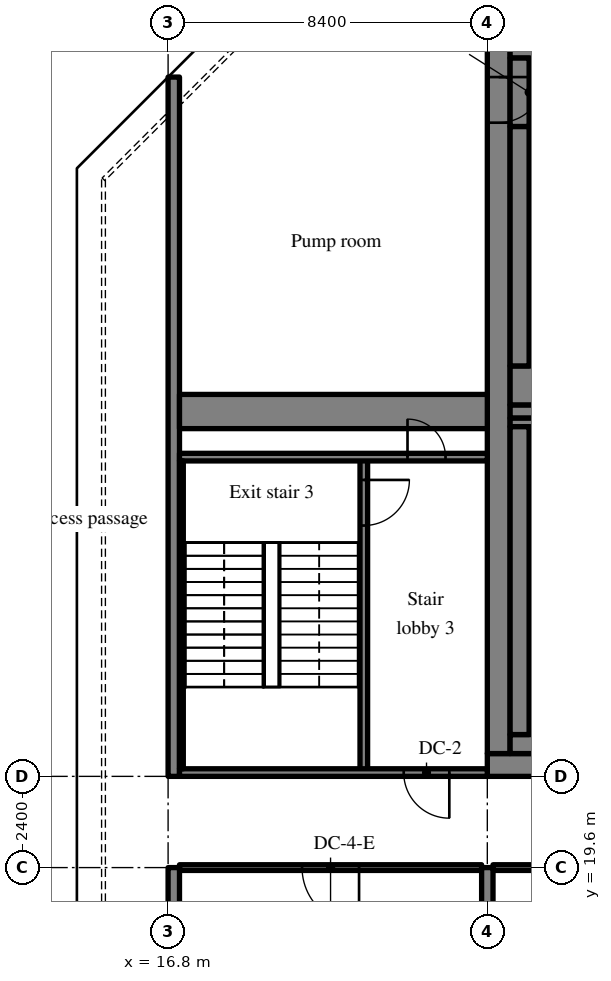
"""IFC4 building model, lengths in metres.
Left out: names, types, materials, properties, quantities, classifications, styles, units other than length and angle.
Written with IfcOpenShell. Run it as: python <this file> out.ifc"""

import sys

from ifc_helpers import new_model, si_unit, direction, frame, frame_2d, origin, place, context, subcontext, project, spatial, rectangle, extrude, source, transform, mapped, element, fill, save


model = new_model("IFC4")
c1 = context("Model", 3, precision=1e-05, world=origin(), true_north=direction((0.0, 1.0)))
c2 = subcontext(c1, "Body", "Model", "MODEL_VIEW")
j1 = project(units=[si_unit("LENGTHUNIT", "METRE"), si_unit("PLANEANGLEUNIT", "RADIAN")], contexts=[c1])
p1 = place(None, origin())
s1 = spatial("IfcSite", under=j1, at=p1, CompositionType="ELEMENT")
p2 = place(p1, origin())
s2 = spatial("IfcBuilding", under=s1, at=p2, CompositionType="ELEMENT")
p3 = place(p2, frame((0.0, 0.0, 264.7)))
s3 = spatial("IfcBuildingStorey", under=s2, at=p3, CompositionType="ELEMENT", Elevation=264.7)
m1 = source(origin(), c2, "Body", "SweptSolid", [
    extrude(rectangle(XDim=50.4, YDim=0.6, at=frame_2d((25.2, 0.0))), origin(), (0.0, 0.0, 1.0), 5.12),
])
p4 = place(p3, frame((25.2, 22.3, 0.0), z_axis=(0.0, 0.0, 1.0), x_axis=(1.0, 0.0, 0.0)))
e1 = element("IfcWall", 1, at=p4, inside=s3, PredefinedType="SHEAR", context=c2, shape_type="MappedRepresentation", body=[
    mapped(m1, transform((0.0, 0.0, 0.0), scale=1.0)),
])
m2 = source(origin(), c2, "Body", "SweptSolid", [
    extrude(rectangle(XDim=1.2, YDim=2.1, at=frame_2d((0.6, 1.05))), frame((0.0, 0.31, 0.0), z_axis=(0.0, -1.0, 0.0), x_axis=(1.0, 0.0, 0.0)), (0.0, 0.0, 1.0), 0.62),
])
p5 = place(p4, frame((22.262, 0.0, 0.0)))
e2 = element("IfcOpeningElement", 2, at=p5, cuts=e1, PredefinedType="OPENING", context=c2, shape_type="MappedRepresentation", body=[
    mapped(m2, transform((0.0, 0.0, 0.0), scale=1.0)),
])
m3 = source(origin(), c2, "Body", "SweptSolid", [
    extrude(rectangle(XDim=0.9, YDim=2.1, at=frame_2d((0.45, 1.05))), frame((0.0, 0.31, 0.0), z_axis=(0.0, -1.0, 0.0), x_axis=(1.0, 0.0, 0.0)), (0.0, 0.0, 1.0), 0.62),
])
p6 = place(p4, frame((17.25, 0.0, 0.0)))
e3 = element("IfcOpeningElement", 3, at=p6, cuts=e1, PredefinedType="OPENING", context=c2, shape_type="MappedRepresentation", body=[
    mapped(m3, transform((0.0, 0.0, 0.0), scale=1.0)),
])
p7 = place(p4, frame((9.656, 0.0, 0.0)))
e4 = element("IfcOpeningElement", 4, at=p7, cuts=e1, PredefinedType="OPENING", context=c2, shape_type="MappedRepresentation", body=[
    mapped(m3, transform((0.0, 0.0, 0.0), scale=1.0)),
])
p8 = place(p4, frame((12.719, 0.0, 0.0)))
e5 = element("IfcOpeningElement", 5, at=p8, cuts=e1, PredefinedType="OPENING", context=c2, shape_type="MappedRepresentation", body=[
    mapped(m3, transform((0.0, 0.0, 0.0), scale=1.0)),
])
m4 = source(origin(), c2, "Body", "SweptSolid", [
    extrude(rectangle(XDim=1.8, YDim=2.1, at=frame_2d((0.9, 1.05))), frame((0.0, 0.31, 0.0), z_axis=(0.0, -1.0, 0.0), x_axis=(1.0, 0.0, 0.0)), (0.0, 0.0, 1.0), 0.62),
])
p9 = place(p4, frame((32.7, 0.0, 0.0)))
e6 = element("IfcOpeningElement", 6, at=p9, cuts=e1, PredefinedType="OPENING", context=c2, shape_type="MappedRepresentation", body=[
    mapped(m4, transform((0.0, 0.0, 0.0), scale=1.0)),
])
p10 = place(p4, frame((6.488, 0.0, 0.0)))
e7 = element("IfcOpeningElement", 7, at=p10, cuts=e1, PredefinedType="OPENING", context=c2, shape_type="MappedRepresentation", body=[
    mapped(m2, transform((0.0, 0.0, 0.0), scale=1.0)),
])
p11 = place(p4, frame((47.925, 0.0, 0.0)))
e8 = element("IfcOpeningElement", 8, at=p11, cuts=e1, PredefinedType="OPENING", context=c2, shape_type="MappedRepresentation", body=[
    mapped(m2, transform((0.0, 0.0, 0.0), scale=1.0)),
])
m5 = source(origin(), c2, "Body", "SweptSolid", [
    extrude(rectangle(XDim=18.8, YDim=0.6, at=frame_2d((9.4, 0.0))), origin(), (0.0, 0.0, 1.0), 5.12),
])
p12 = place(p3, frame((25.5, 22.6, 0.0), z_axis=(0.0, 0.0, 1.0), x_axis=(0.0, 1.0, 0.0)))
e9 = element("IfcWall", 9, at=p12, inside=s3, PredefinedType="SHEAR", context=c2, shape_type="MappedRepresentation", body=[
    mapped(m5, transform((0.0, 0.0, 0.0), scale=1.0)),
])
p13 = place(p12, frame((16.6, 0.0, 0.0)))
e10 = element("IfcOpeningElement", 10, at=p13, cuts=e9, PredefinedType="OPENING", context=c2, shape_type="MappedRepresentation", body=[
    mapped(m2, transform((0.0, 0.0, 0.0), scale=1.0)),
])
m6 = source(origin(), c2, "Body", "SweptSolid", [
    extrude(rectangle(XDim=7.625, YDim=0.35, at=frame_2d((3.812, 0.0))), origin(), (0.0, 0.0, 1.0), 5.12),
])
p14 = place(p3, frame((25.8, 31.6, 0.0), z_axis=(0.0, 0.0, 1.0), x_axis=(1.0, 0.0, 0.0)))
e11 = element("IfcWall", 11, at=p14, inside=s3, PredefinedType="SHEAR", context=c2, shape_type="MappedRepresentation", body=[
    mapped(m6, transform((0.0, 0.0, 0.0), scale=1.0)),
])
m7 = source(origin(), c2, "Body", "SweptSolid", [
    extrude(rectangle(XDim=1.1, YDim=2.1, at=frame_2d((0.55, 1.05))), frame((0.0, 0.185, 0.0), z_axis=(0.0, -1.0, 0.0), x_axis=(1.0, 0.0, 0.0)), (0.0, 0.0, 1.0), 0.37),
])
p15 = place(p14, frame((5.938, 0.0, 0.0)))
e12 = element("IfcOpeningElement", 12, at=p15, cuts=e11, PredefinedType="OPENING", context=c2, shape_type="MappedRepresentation", body=[
    mapped(m7, transform((0.0, 0.0, 0.0), scale=1.0)),
])
m8 = source(origin(), c2, "Body", "SweptSolid", [
    extrude(rectangle(XDim=12.5, YDim=0.3, at=frame_2d((6.25, 0.0))), origin(), (0.0, 0.0, 1.0), 5.12),
])
p16 = place(p3, frame((16.95, 7.1, 0.0), z_axis=(0.0, 0.0, 1.0), x_axis=(0.0, 1.0, 0.0)))
e13 = element("IfcWall", 13, at=p16, inside=s3, PredefinedType="SHEAR", context=c2, shape_type="MappedRepresentation", body=[
    mapped(m8, transform((0.0, 0.0, 0.0), scale=1.0)),
])
m9 = source(origin(), c2, "Body", "SweptSolid", [
    extrude(rectangle(XDim=18.4, YDim=0.3, at=frame_2d((9.2, 0.0))), origin(), (0.0, 0.0, 1.0), 5.12),
])
p17 = place(p3, frame((16.95, 22.0, 0.0), z_axis=(0.0, 0.0, 1.0), x_axis=(0.0, 1.0, 0.0)))
e14 = element("IfcWall", 14, at=p17, inside=s3, PredefinedType="SHEAR", context=c2, shape_type="MappedRepresentation", body=[
    mapped(m9, transform((0.0, 0.0, 0.0), scale=1.0)),
])
m10 = source(origin(), c2, "Body", "SweptSolid", [
    extrude(rectangle(XDim=14.1, YDim=0.3, at=frame_2d((7.05, 0.0))), origin(), (0.0, 0.0, 1.0), 5.12),
])
p18 = place(p3, frame((25.2, 5.5, 0.0), z_axis=(0.0, 0.0, 1.0), x_axis=(0.0, 1.0, 0.0)))
e15 = element("IfcWall", 15, at=p18, inside=s3, PredefinedType="SHEAR", context=c2, shape_type="MappedRepresentation", body=[
    mapped(m10, transform((0.0, 0.0, 0.0), scale=1.0)),
])
m11 = source(origin(), c2, "Body", "SweptSolid", [
    extrude(rectangle(XDim=8.1, YDim=0.9, at=frame_2d((4.05, 0.0))), origin(), (0.0, 0.0, 1.0), 5.12),
])
p19 = place(p3, frame((17.1, 31.6, 0.0), z_axis=(0.0, 0.0, 1.0), x_axis=(1.0, 0.0, 0.0)))
e16 = element("IfcWall", 16, at=p19, inside=s3, PredefinedType="SHEAR", context=c2, shape_type="MappedRepresentation", body=[
    mapped(m11, transform((0.0, 0.0, 0.0), scale=1.0)),
])
m12 = source(origin(), c2, "Body", "SweptSolid", [
    extrude(rectangle(XDim=8.3, YDim=0.2, at=frame_2d((4.15, 0.0))), origin(), (0.0, 0.0, 1.0), 5.12),
])
p20 = place(p3, frame((21.95, 22.1, 0.0), z_axis=(0.0, 0.0, 1.0), x_axis=(0.0, 1.0, 0.0)))
e17 = element("IfcWall", 17, at=p20, inside=s3, PredefinedType="SOLIDWALL", context=c2, shape_type="MappedRepresentation", body=[
    mapped(m12, transform((0.0, 0.0, 0.0), scale=1.0)),
])
m13 = source(origin(), c2, "Body", "SweptSolid", [
    extrude(rectangle(XDim=1.2, YDim=2.1, at=frame_2d((0.6, 1.05))), frame((0.0, 0.11, 0.0), z_axis=(0.0, -1.0, 0.0), x_axis=(1.0, 0.0, 0.0)), (0.0, 0.0, 1.0), 0.22),
])
p21 = place(p20, frame((6.5, 0.0, 0.0)))
e18 = element("IfcOpeningElement", 18, at=p21, cuts=e17, PredefinedType="OPENING", context=c2, shape_type="MappedRepresentation", body=[
    mapped(m13, transform((0.0, 0.0, 0.0), scale=1.0)),
])
m14 = source(origin(), c2, "Body", "SweptSolid", [
    extrude(rectangle(XDim=8.1, YDim=0.2, at=frame_2d((4.05, 0.0))), origin(), (0.0, 0.0, 1.0), 5.12),
])
p22 = place(p3, frame((17.1, 22.1, 0.0), z_axis=(0.0, 0.0, 1.0), x_axis=(1.0, 0.0, 0.0)))
e19 = element("IfcWall", 19, at=p22, inside=s3, PredefinedType="SOLIDWALL", context=c2, shape_type="MappedRepresentation", body=[
    mapped(m14, transform((0.0, 0.0, 0.0), scale=1.0)),
])
p23 = place(p22, frame((5.9, 0.0, 0.0)))
e20 = element("IfcOpeningElement", 20, at=p23, cuts=e19, PredefinedType="OPENING", context=c2, shape_type="MappedRepresentation", body=[
    mapped(m13, transform((0.0, 0.0, 0.0), scale=1.0)),
])
p24 = place(p3, frame((25.2, 30.4, 0.0), z_axis=(0.0, 0.0, 1.0), x_axis=(-1.0, 0.0, 0.0)))
e21 = element("IfcWall", 21, at=p24, inside=s3, PredefinedType="SOLIDWALL", context=c2, shape_type="MappedRepresentation", body=[
    mapped(m14, transform((0.0, 0.0, 0.0), scale=1.0)),
])
m15 = source(origin(), c2, "Body", "SweptSolid", [
    extrude(rectangle(XDim=1.0, YDim=2.1, at=frame_2d((0.5, 1.05))), frame((0.0, 0.11, 0.0), z_axis=(0.0, -1.0, 0.0), x_axis=(1.0, 0.0, 0.0)), (0.0, 0.0, 1.0), 0.22),
])
p25 = place(p24, frame((1.1, 0.0, 0.0)))
e22 = element("IfcOpeningElement", 22, at=p25, cuts=e21, PredefinedType="OPENING", context=c2, shape_type="MappedRepresentation", body=[
    mapped(m15, transform((0.0, 0.0, 0.0), scale=1.0)),
])
m16 = source(origin(), c2, "Body", "SweptSolid", [
    extrude(rectangle(XDim=5.15, YDim=0.5, at=frame_2d((2.575, 0.0))), origin(), (0.0, 0.0, 1.0), 5.12),
])
p26 = place(p3, frame((25.8, 22.85, 0.0), z_axis=(0.0, 0.0, 1.0), x_axis=(1.0, 0.0, 0.0)))
e23 = element("IfcWall", 23, at=p26, inside=s3, PredefinedType="SOLIDWALL", context=c2, shape_type="MappedRepresentation", body=[
    mapped(m16, transform((0.0, 0.0, 0.0), scale=1.0)),
])
m17 = source(origin(), c2, "Body", "SweptSolid", [
    extrude(rectangle(XDim=5.15, YDim=0.225, at=frame_2d((2.575, 0.0))), origin(), (0.0, 0.0, 1.0), 5.12),
])
p27 = place(p3, frame((25.8, 31.312, 0.0), z_axis=(0.0, 0.0, 1.0), x_axis=(1.0, 0.0, 0.0)))
e24 = element("IfcWall", 24, at=p27, inside=s3, PredefinedType="SOLIDWALL", context=c2, shape_type="MappedRepresentation", body=[
    mapped(m17, transform((0.0, 0.0, 0.0), scale=1.0)),
])
m18 = source(origin(), c2, "Body", "SweptSolid", [
    extrude(rectangle(XDim=8.1, YDim=0.5, at=frame_2d((4.05, 0.0))), origin(), (0.0, 0.0, 1.0), 5.12),
])
p28 = place(p3, frame((26.05, 23.1, 0.0), z_axis=(0.0, 0.0, 1.0), x_axis=(0.0, 1.0, 0.0)))
e25 = element("IfcWall", 25, at=p28, inside=s3, PredefinedType="SOLIDWALL", context=c2, shape_type="MappedRepresentation", body=[
    mapped(m18, transform((0.0, 0.0, 0.0), scale=1.0)),
])
m19 = source(origin(), c2, "Body", "SweptSolid", [
    extrude(rectangle(XDim=8.1, YDim=0.1, at=frame_2d((4.05, 0.0))), origin(), (0.0, 0.0, 1.0), 5.12),
])
p29 = place(p3, frame((17.15, 22.2, 0.0), z_axis=(0.0, 0.0, 1.0), x_axis=(0.0, 1.0, 0.0)))
e26 = element("IfcWall", 26, at=p29, inside=s3, PredefinedType="SOLIDWALL", context=c2, shape_type="MappedRepresentation", body=[
    mapped(m19, transform((0.0, 0.0, 0.0), scale=1.0)),
])
p30 = place(p3, frame((25.8, 41.15, 0.0), z_axis=(0.0, 0.0, 1.0), x_axis=(1.0, 0.0, 0.0)))
e27 = element("IfcWall", 27, at=p30, inside=s3, PredefinedType="SOLIDWALL", context=c2, shape_type="MappedRepresentation", body=[
    mapped(m16, transform((0.0, 0.0, 0.0), scale=1.0)),
])
m20 = source(origin(), c2, "Body", "SweptSolid", [
    extrude(rectangle(XDim=5.15, YDim=1.025, at=frame_2d((2.575, 0.0))), origin(), (0.0, 0.0, 1.0), 5.12),
])
p31 = place(p3, frame((25.8, 32.287, 0.0), z_axis=(0.0, 0.0, 1.0), x_axis=(1.0, 0.0, 0.0)))
e28 = element("IfcWall", 28, at=p31, inside=s3, PredefinedType="SOLIDWALL", context=c2, shape_type="MappedRepresentation", body=[
    mapped(m20, transform((0.0, 0.0, 0.0), scale=1.0)),
])
m21 = source(origin(), c2, "Body", "SweptSolid", [
    extrude(rectangle(XDim=6.3, YDim=0.5, at=frame_2d((3.15, 0.0))), origin(), (0.0, 0.0, 1.0), 5.12),
])
p32 = place(p3, frame((26.05, 32.8, 0.0), z_axis=(0.0, 0.0, 1.0), x_axis=(0.0, 1.0, 0.0)))
e29 = element("IfcWall", 29, at=p32, inside=s3, PredefinedType="SOLIDWALL", context=c2, shape_type="MappedRepresentation", body=[
    mapped(m21, transform((0.0, 0.0, 0.0), scale=1.0)),
])
m22 = source(origin(), c2, "Body", "SweptSolid", [
    extrude(rectangle(XDim=1.8, YDim=0.5, at=frame_2d((0.9, 0.0))), origin(), (0.0, 0.0, 1.0), 2.12),
])
p33 = place(p3, frame((26.05, 39.1, 3.0), z_axis=(0.0, 0.0, 1.0), x_axis=(0.0, 1.0, 0.0)))
e30 = element("IfcWall", 30, at=p33, inside=s3, PredefinedType="SOLIDWALL", context=c2, shape_type="MappedRepresentation", body=[
    mapped(m22, transform((0.0, 0.0, 0.0), scale=1.0)),
])
m23 = source(origin(), c2, "Body", "SweptSolid", [
    extrude(rectangle(XDim=7.95, YDim=0.15, at=frame_2d((3.975, 0.0))), origin(), (0.0, 0.0, 1.0), 4.37),
])
p34 = place(p3, frame((17.1, 19.6, 0.0), z_axis=(0.0, 0.0, 1.0), x_axis=(1.0, 0.0, 0.0)))
e31 = element("IfcWall", 31, at=p34, inside=s3, PredefinedType="PARTITIONING", context=c2, shape_type="MappedRepresentation", body=[
    mapped(m23, transform((0.0, 0.0, 0.0), scale=1.0)),
])
m24 = source(origin(), c2, "Body", "SweptSolid", [
    extrude(rectangle(XDim=1.5, YDim=2.1, at=frame_2d((0.75, 1.05))), frame((0.0, 0.085, 0.0), z_axis=(0.0, -1.0, 0.0), x_axis=(1.0, 0.0, 0.0)), (0.0, 0.0, 1.0), 0.17),
])
p35 = place(p34, frame((3.225, 0.0, 0.0)))
e32 = element("IfcOpeningElement", 32, at=p35, cuts=e31, PredefinedType="OPENING", context=c2, shape_type="MappedRepresentation", body=[
    mapped(m24, transform((0.0, 0.0, 0.0), scale=1.0)),
])
m25 = source(origin(), c2, "Body", "SweptSolid", [
    extrude(rectangle(XDim=8.1, YDim=0.15, at=frame_2d((4.05, 0.0))), origin(), (0.0, 0.0, 1.0), 4.37),
])
p36 = place(p3, frame((25.35, 19.6, 0.0), z_axis=(0.0, 0.0, 1.0), x_axis=(1.0, 0.0, 0.0)))
e33 = element("IfcWall", 33, at=p36, inside=s3, PredefinedType="PARTITIONING", context=c2, shape_type="MappedRepresentation", body=[
    mapped(m25, transform((0.0, 0.0, 0.0), scale=1.0)),
])
m26 = source(origin(), c2, "Body", "SweptSolid", [
    extrude(rectangle(XDim=1.2, YDim=2.1, at=frame_2d((0.6, 1.05))), frame((0.0, 0.085, 0.0), z_axis=(0.0, -1.0, 0.0), x_axis=(1.0, 0.0, 0.0)), (0.0, 0.0, 1.0), 0.17),
])
p37 = place(p36, frame((3.45, 0.0, 0.0)))
e34 = element("IfcOpeningElement", 34, at=p37, cuts=e33, PredefinedType="OPENING", context=c2, shape_type="MappedRepresentation", body=[
    mapped(m26, transform((0.0, 0.0, 0.0), scale=1.0)),
])
m27 = source(origin(), c2, "Body", "SweptSolid", [
    extrude(rectangle(XDim=1.2, YDim=2.1, at=frame_2d((0.6, 1.05))), frame((0.0, 0.025, 0.0), z_axis=(0.0, -1.0, 0.0), x_axis=(1.0, 0.0, 0.0)), (0.0, 0.0, 1.0), 0.05),
])
p38 = place(p21, origin())
e35 = element("IfcDoor", 35, at=p38, inside=s3, OperationType="SINGLE_SWING_RIGHT", PredefinedType="DOOR", context=c2, shape_type="MappedRepresentation", body=[
    mapped(m27, transform((0.0, 0.0, 0.0), scale=1.0)),
])
fill(e18, e35)
p39 = place(p23, origin())
e36 = element("IfcDoor", 36, at=p39, inside=s3, OperationType="SINGLE_SWING_RIGHT", PredefinedType="DOOR", context=c2, shape_type="MappedRepresentation", body=[
    mapped(m27, transform((0.0, 0.0, 0.0), scale=1.0)),
])
fill(e20, e36)
m28 = source(origin(), c2, "Body", "SweptSolid", [
    extrude(rectangle(XDim=1.0, YDim=2.1, at=frame_2d((0.5, 1.05))), frame((0.0, 0.025, 0.0), z_axis=(0.0, -1.0, 0.0), x_axis=(1.0, 0.0, 0.0)), (0.0, 0.0, 1.0), 0.05),
])
p40 = place(p25, origin())
e37 = element("IfcDoor", 37, at=p40, inside=s3, OperationType="SINGLE_SWING_RIGHT", PredefinedType="DOOR", context=c2, shape_type="MappedRepresentation", body=[
    mapped(m28, transform((0.0, 0.0, 0.0), scale=1.0)),
])
fill(e22, e37)
m29 = source(origin(), c2, "Body", "SweptSolid", [
    extrude(rectangle(XDim=1.5, YDim=2.1, at=frame_2d((0.75, 1.05))), frame((0.0, 0.025, 0.0), z_axis=(0.0, -1.0, 0.0), x_axis=(1.0, 0.0, 0.0)), (0.0, 0.0, 1.0), 0.05),
])
p41 = place(p35, origin())
e38 = element("IfcDoor", 38, at=p41, inside=s3, OperationType="SINGLE_SWING_RIGHT", PredefinedType="DOOR", context=c2, shape_type="MappedRepresentation", body=[
    mapped(m29, transform((0.0, 0.0, 0.0), scale=1.0)),
])
fill(e32, e38)
p42 = place(p13, origin())
e39 = element("IfcDoor", 39, at=p42, inside=s3, OperationType="SINGLE_SWING_RIGHT", PredefinedType="DOOR", context=c2, shape_type="MappedRepresentation", body=[
    mapped(m27, transform((0.0, 0.0, 0.0), scale=1.0)),
])
fill(e10, e39)
save(model, sys.argv[1])
